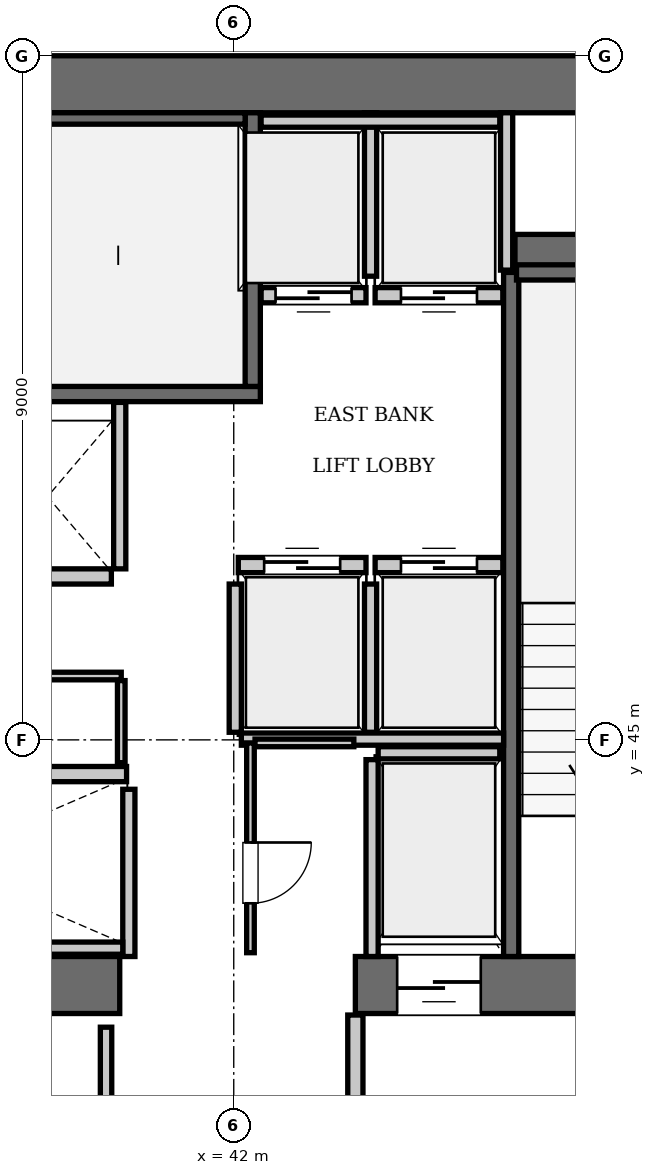
"""IFC4 building model, lengths in metres.
Left out: names, types, materials, properties, quantities, classifications, styles, units other than length and angle.
Written with IfcOpenShell. Run it as: python <this file> out.ifc"""

import sys

from ifc_helpers import new_model, si_unit, direction, frame, frame_2d, origin, place, context, subcontext, project, spatial, rectangle, extrude, element, fill, save


model = new_model("IFC4")
c1 = context("Model", 3, precision=1e-05, world=origin(), true_north=direction((0.0, 1.0)))
c2 = subcontext(c1, "Body", "Model", "MODEL_VIEW")
j1 = project(units=[si_unit("LENGTHUNIT", "METRE"), si_unit("PLANEANGLEUNIT", "RADIAN")], contexts=[c1])
p1 = place(None, origin())
s1 = spatial("IfcSite", under=j1, at=p1, CompositionType="ELEMENT")
p2 = place(p1, origin())
s2 = spatial("IfcBuilding", under=s1, at=p2, CompositionType="ELEMENT")
p3 = place(p2, frame((0.0, 0.0, 204.4)))
s3 = spatial("IfcBuildingStorey", under=s2, at=p3, CompositionType="ELEMENT", Elevation=204.4)
p4 = place(p3, frame((25.2, 53.625, 0.0), z_axis=(0.0, 0.0, 1.0), x_axis=(1.0, 0.0, 0.0)))
e1 = element("IfcWall", 1, at=p4, inside=s3, PredefinedType="SHEAR", context=c2, shape_type="SweptSolid", body=[
    extrude(rectangle(XDim=25.2, YDim=0.75, at=frame_2d((12.6, 0.0))), origin(), (0.0, 0.0, 1.0), 3.85),
])
p5 = place(p3, frame((35.1, 41.775, 0.0), z_axis=(0.0, 0.0, 1.0), x_axis=(1.0, 0.0, 0.0)))
e2 = element("IfcWall", 2, at=p5, inside=s3, PredefinedType="SHEAR", context=c2, shape_type="SweptSolid", body=[
    extrude(rectangle(XDim=5.4, YDim=0.75, at=frame_2d((2.7, 0.0))), origin(), (0.0, 0.0, 1.0), 3.85),
])
p6 = place(p3, frame((43.6, 41.775, 0.0), z_axis=(0.0, 0.0, 1.0), x_axis=(1.0, 0.0, 0.0)))
e3 = element("IfcWall", 3, at=p6, inside=s3, PredefinedType="SHEAR", context=c2, shape_type="SweptSolid", body=[
    extrude(rectangle(XDim=6.8, YDim=0.75, at=frame_2d((3.4, 0.0))), origin(), (0.0, 0.0, 1.0), 3.85),
])
p7 = place(p6, frame((3.9, 0.0, 0.0)))
e4 = element("IfcOpeningElement", 4, at=p7, cuts=e3, PredefinedType="OPENING", context=c2, shape_type="SweptSolid", body=[
    extrude(rectangle(XDim=1.15, YDim=2.15, at=frame_2d((0.575, 1.075))), frame((0.0, 0.385, 0.0), z_axis=(0.0, -1.0, 0.0), x_axis=(1.0, 0.0, 0.0)), (0.0, 0.0, 1.0), 0.77),
])
p8 = place(p6, frame((0.55, 0.0, 0.0)))
e5 = element("IfcOpeningElement", 5, at=p8, cuts=e3, PredefinedType="OPENING", context=c2, shape_type="SweptSolid", body=[
    extrude(rectangle(XDim=1.1, YDim=2.2, at=frame_2d((0.55, 1.1))), frame((0.0, 0.385, 0.0), z_axis=(0.0, -1.0, 0.0), x_axis=(1.0, 0.0, 0.0)), (0.0, 0.0, 1.0), 0.77),
])
p9 = place(p3, frame((45.7, 51.4, 0.0), z_axis=(0.0, 0.0, 1.0), x_axis=(1.0, 0.0, 0.0)))
e6 = element("IfcWall", 6, at=p9, inside=s3, PredefinedType="SHEAR", context=c2, shape_type="SweptSolid", body=[
    extrude(rectangle(XDim=3.95, YDim=0.5, at=frame_2d((1.975, 0.0))), origin(), (0.0, 0.0, 1.0), 3.85),
])
p10 = place(p3, frame((33.25, 49.55, 0.0), z_axis=(0.0, 0.0, 1.0), x_axis=(1.0, 0.0, 0.0)))
e7 = element("IfcWall", 7, at=p10, inside=s3, PredefinedType="SOLIDWALL", context=c2, shape_type="SweptSolid", body=[
    extrude(rectangle(XDim=9.1, YDim=0.2, at=frame_2d((4.55, 0.0))), origin(), (0.0, 0.0, 1.0), 3.61),
])
p11 = place(p3, frame((42.25, 49.65, 0.0), z_axis=(0.0, 0.0, 1.0), x_axis=(0.0, 1.0, 0.0)))
e8 = element("IfcWall", 8, at=p11, inside=s3, PredefinedType="SOLIDWALL", context=c2, shape_type="SweptSolid", body=[
    extrude(rectangle(XDim=3.6, YDim=0.2, at=frame_2d((1.8, 0.0))), origin(), (0.0, 0.0, 1.0), 3.61),
])
p12 = place(p3, frame((33.45, 53.175, 0.0), z_axis=(0.0, 0.0, 1.0), x_axis=(1.0, 0.0, 0.0)))
e9 = element("IfcWall", 9, at=p12, inside=s3, PredefinedType="SOLIDWALL", context=c2, shape_type="SweptSolid", body=[
    extrude(rectangle(XDim=8.7, YDim=0.15, at=frame_2d((4.35, 0.0))), origin(), (0.0, 0.0, 1.0), 3.61),
])
p13 = place(p3, frame((45.65, 42.15, 0.0), z_axis=(0.0, 0.0, 1.0), x_axis=(0.0, 1.0, 0.0)))
e10 = element("IfcWall", 10, at=p13, inside=s3, PredefinedType="SOLIDWALL", context=c2, shape_type="SweptSolid", body=[
    extrude(rectangle(XDim=9.0, YDim=0.2, at=frame_2d((4.5, 0.0))), origin(), (0.0, 0.0, 1.0), 3.61),
])
p14 = place(p3, frame((45.72, 51.15, 0.0), z_axis=(0.0, 0.0, 1.0), x_axis=(1.0, 0.0, 0.0)))
e11 = element("IfcWall", 11, at=p14, inside=s3, PredefinedType="SOLIDWALL", context=c2, shape_type="SweptSolid", body=[
    extrude(rectangle(XDim=3.5, YDim=0.2, at=frame_2d((1.75, 0.0))), origin(), (0.0, 0.0, 1.0), 3.61),
])
p15 = place(p3, frame((42.06, 47.3, 0.0), z_axis=(0.0, 0.0, 1.0), x_axis=(1.0, 0.0, 0.0)))
e12 = element("IfcWall", 12, at=p15, inside=s3, PredefinedType="SOLIDWALL", context=c2, shape_type="SweptSolid", body=[
    extrude(rectangle(XDim=1.68, YDim=0.2, at=frame_2d((0.84, 0.0))), origin(), (0.0, 0.0, 1.0), 3.61),
])
p16 = place(p15, frame((0.34, 0.0, 0.0)))
e13 = element("IfcOpeningElement", 13, at=p16, cuts=e12, PredefinedType="OPENING", context=c2, shape_type="SweptSolid", body=[
    extrude(rectangle(XDim=1.0, YDim=2.15, at=frame_2d((0.5, 1.075))), frame((0.0, 0.11, 0.0), z_axis=(0.0, -1.0, 0.0), x_axis=(1.0, 0.0, 0.0)), (0.0, 0.0, 1.0), 0.22),
])
p17 = place(p3, frame((43.86, 47.3, 0.0), z_axis=(0.0, 0.0, 1.0), x_axis=(1.0, 0.0, 0.0)))
e14 = element("IfcWall", 14, at=p17, inside=s3, PredefinedType="SOLIDWALL", context=c2, shape_type="SweptSolid", body=[
    extrude(rectangle(XDim=1.68, YDim=0.2, at=frame_2d((0.84, 0.0))), origin(), (0.0, 0.0, 1.0), 3.61),
])
p18 = place(p17, frame((0.34, 0.0, 0.0)))
e15 = element("IfcOpeningElement", 15, at=p18, cuts=e14, PredefinedType="OPENING", context=c2, shape_type="SweptSolid", body=[
    extrude(rectangle(XDim=1.0, YDim=2.15, at=frame_2d((0.5, 1.075))), frame((0.0, 0.11, 0.0), z_axis=(0.0, -1.0, 0.0), x_axis=(1.0, 0.0, 0.0)), (0.0, 0.0, 1.0), 0.22),
])
p19 = place(p3, frame((42.36, 50.85, 0.0), z_axis=(0.0, 0.0, 1.0), x_axis=(1.0, 0.0, 0.0)))
e16 = element("IfcWall", 16, at=p19, inside=s3, PredefinedType="SOLIDWALL", context=c2, shape_type="SweptSolid", body=[
    extrude(rectangle(XDim=1.38, YDim=0.2, at=frame_2d((0.69, 0.0))), origin(), (0.0, 0.0, 1.0), 3.61),
])
p20 = place(p19, frame((0.19, 0.0, 0.0)))
e17 = element("IfcOpeningElement", 17, at=p20, cuts=e16, PredefinedType="OPENING", context=c2, shape_type="SweptSolid", body=[
    extrude(rectangle(XDim=1.0, YDim=2.15, at=frame_2d((0.5, 1.075))), frame((0.0, 0.11, 0.0), z_axis=(0.0, -1.0, 0.0), x_axis=(1.0, 0.0, 0.0)), (0.0, 0.0, 1.0), 0.22),
])
p21 = place(p3, frame((43.86, 50.85, 0.0), z_axis=(0.0, 0.0, 1.0), x_axis=(1.0, 0.0, 0.0)))
e18 = element("IfcWall", 18, at=p21, inside=s3, PredefinedType="SOLIDWALL", context=c2, shape_type="SweptSolid", body=[
    extrude(rectangle(XDim=1.68, YDim=0.2, at=frame_2d((0.84, 0.0))), origin(), (0.0, 0.0, 1.0), 3.61),
])
p22 = place(p21, frame((0.34, 0.0, 0.0)))
e19 = element("IfcOpeningElement", 19, at=p22, cuts=e18, PredefinedType="OPENING", context=c2, shape_type="SweptSolid", body=[
    extrude(rectangle(XDim=1.0, YDim=2.15, at=frame_2d((0.5, 1.075))), frame((0.0, 0.11, 0.0), z_axis=(0.0, -1.0, 0.0), x_axis=(1.0, 0.0, 0.0)), (0.0, 0.0, 1.0), 0.22),
])
p23 = place(p3, frame((38.91, 44.55, 0.0), z_axis=(0.0, 0.0, 1.0), x_axis=(1.0, 0.0, 0.0)))
e20 = element("IfcWall", 20, at=p23, inside=s3, PredefinedType="SOLIDWALL", context=c2, shape_type="SweptSolid", body=[
    extrude(rectangle(XDim=1.68, YDim=0.2, at=frame_2d((0.84, 0.0))), origin(), (0.0, 0.0, 1.0), 3.61),
])
p24 = place(p3, frame((38.71, 47.15, 0.0), z_axis=(0.0, 0.0, 1.0), x_axis=(1.0, 0.0, 0.0)))
e21 = element("IfcWall", 21, at=p24, inside=s3, PredefinedType="SOLIDWALL", context=c2, shape_type="SweptSolid", body=[
    extrude(rectangle(XDim=1.68, YDim=0.2, at=frame_2d((0.84, 0.0))), origin(), (0.0, 0.0, 1.0), 3.61),
])
p25 = place(p3, frame((43.9, 44.83, 0.0), z_axis=(0.0, 0.0, 1.0), x_axis=(1.0, 0.0, 0.0)))
e22 = element("IfcWall", 22, at=p25, inside=s3, PredefinedType="SOLIDWALL", context=c2, shape_type="SweptSolid", body=[
    extrude(rectangle(XDim=1.6, YDim=0.16, at=frame_2d((0.8, 0.0))), origin(), (0.0, 0.0, 1.0), 3.61),
])
p26 = place(p3, frame((43.82, 42.15, 0.0), z_axis=(0.0, 0.0, 1.0), x_axis=(0.0, 1.0, 0.0)))
e23 = element("IfcWall", 23, at=p26, inside=s3, PredefinedType="SOLIDWALL", context=c2, shape_type="SweptSolid", body=[
    extrude(rectangle(XDim=2.59, YDim=0.16, at=frame_2d((1.295, 0.0))), origin(), (0.0, 0.0, 1.0), 3.61),
])
for number, where, z_axis, x_axis in (
    (24, (42.02, 45.1, 0.0), (0.0, 0.0, 1.0), (0.0, 1.0, 0.0)),
    (25, (43.8, 45.1, 0.0), (0.0, 0.0, 1.0), (0.0, 1.0, 0.0)),
):
    element("IfcWall", number, at=place(p3, frame(where, z_axis=z_axis, x_axis=x_axis)), inside=s3, PredefinedType="SOLIDWALL", context=c2, shape_type="SweptSolid", body=[
        extrude(rectangle(XDim=1.95, YDim=0.16, at=frame_2d((0.975, 0.0))), origin(), (0.0, 0.0, 1.0), 3.61),
    ])
p27 = place(p3, frame((42.1, 45.01, 0.0), z_axis=(0.0, 0.0, 1.0), x_axis=(1.0, 0.0, 0.0)))
e26 = element("IfcWall", 26, at=p27, inside=s3, PredefinedType="SOLIDWALL", context=c2, shape_type="SweptSolid", body=[
    extrude(rectangle(XDim=3.45, YDim=0.16, at=frame_2d((1.725, 0.0))), origin(), (0.0, 0.0, 1.0), 3.61),
])
p28 = place(p3, frame((45.59, 51.18, 0.0), z_axis=(0.0, 0.0, 1.0), x_axis=(0.0, 1.0, 0.0)))
e27 = element("IfcWall", 27, at=p28, inside=s3, PredefinedType="SOLIDWALL", context=c2, shape_type="SweptSolid", body=[
    extrude(rectangle(XDim=2.07, YDim=0.16, at=frame_2d((1.035, 0.0))), origin(), (0.0, 0.0, 1.0), 3.61),
])
p29 = place(p3, frame((43.8, 51.1, 0.0), z_axis=(0.0, 0.0, 1.0), x_axis=(0.0, 1.0, 0.0)))
e28 = element("IfcWall", 28, at=p29, inside=s3, PredefinedType="SOLIDWALL", context=c2, shape_type="SweptSolid", body=[
    extrude(rectangle(XDim=2.15, YDim=0.16, at=frame_2d((1.075, 0.0))), origin(), (0.0, 0.0, 1.0), 3.61),
])
p30 = place(p3, frame((42.36, 53.14, 0.0), z_axis=(0.0, 0.0, 1.0), x_axis=(1.0, 0.0, 0.0)))
e29 = element("IfcWall", 29, at=p30, inside=s3, PredefinedType="SOLIDWALL", context=c2, shape_type="SweptSolid", body=[
    extrude(rectangle(XDim=3.14, YDim=0.16, at=frame_2d((1.57, 0.0))), origin(), (0.0, 0.0, 1.0), 3.61),
])
p31 = place(p3, frame((40.62, 42.15, 0.0), z_axis=(0.0, 0.0, 1.0), x_axis=(0.0, 1.0, 0.0)))
e30 = element("IfcWall", 30, at=p31, inside=s3, PredefinedType="SOLIDWALL", context=c2, shape_type="SweptSolid", body=[
    extrude(rectangle(XDim=2.2, YDim=0.16, at=frame_2d((1.1, 0.0))), origin(), (0.0, 0.0, 1.0), 3.61),
])
p32 = place(p3, frame((35.52, 42.26, 0.0), z_axis=(0.0, 0.0, 1.0), x_axis=(1.0, 0.0, 0.0)))
e31 = element("IfcWall", 31, at=p32, inside=s3, PredefinedType="SOLIDWALL", context=c2, shape_type="SweptSolid", body=[
    extrude(rectangle(XDim=5.02, YDim=0.16, at=frame_2d((2.51, 0.0))), origin(), (0.0, 0.0, 1.0), 3.61),
])
p33 = place(p3, frame((40.5, 47.25, 0.0), z_axis=(0.0, 0.0, 1.0), x_axis=(0.0, 1.0, 0.0)))
e32 = element("IfcWall", 32, at=p33, inside=s3, PredefinedType="SOLIDWALL", context=c2, shape_type="SweptSolid", body=[
    extrude(rectangle(XDim=2.19, YDim=0.16, at=frame_2d((1.095, 0.0))), origin(), (0.0, 0.0, 1.0), 3.61),
])
p34 = place(p3, frame((43.6, 38.31, 0.0), z_axis=(0.0, 0.0, 1.0), x_axis=(0.0, 1.0, 0.0)))
e33 = element("IfcWall", 33, at=p34, inside=s3, PredefinedType="PARTITIONING", context=c2, shape_type="SweptSolid", body=[
    extrude(rectangle(XDim=3.07, YDim=0.2, at=frame_2d((1.535, 0.0))), origin(), (0.0, 0.0, 1.0), 3.61),
])
p35 = place(p3, frame((38.02, 45.84, 0.0), z_axis=(0.0, 0.0, 1.0), x_axis=(1.0, 0.0, 0.0)))
e34 = element("IfcWall", 34, at=p35, inside=s3, PredefinedType="PARTITIONING", context=c2, shape_type="SweptSolid", body=[
    extrude(rectangle(XDim=2.5, YDim=0.1, at=frame_2d((1.25, 0.0))), origin(), (0.0, 0.0, 1.0), 3.61),
])
p36 = place(p35, frame((0.75, 0.0, 0.0)))
e35 = element("IfcOpeningElement", 35, at=p36, cuts=e34, PredefinedType="OPENING", context=c2, shape_type="SweptSolid", body=[
    extrude(rectangle(XDim=0.8, YDim=2.05, at=frame_2d((0.4, 1.025))), frame((0.0, 0.06, 0.0), z_axis=(0.0, -1.0, 0.0), x_axis=(1.0, 0.0, 0.0)), (0.0, 0.0, 1.0), 0.12),
])
p37 = place(p3, frame((40.52, 44.7, 0.0), z_axis=(0.0, 0.0, 1.0), x_axis=(0.0, 1.0, 0.0)))
e36 = element("IfcWall", 36, at=p37, inside=s3, PredefinedType="PARTITIONING", context=c2, shape_type="SweptSolid", body=[
    extrude(rectangle(XDim=1.08, YDim=0.1, at=frame_2d((0.54, 0.0))), origin(), (0.0, 0.0, 1.0), 3.61),
])
p38 = place(p3, frame((42.22, 42.2, 0.0), z_axis=(0.0, 0.0, 1.0), x_axis=(0.0, 1.0, 0.0)))
e37 = element("IfcWall", 37, at=p38, inside=s3, PredefinedType="PARTITIONING", context=c2, shape_type="SweptSolid", body=[
    extrude(rectangle(XDim=2.76, YDim=0.1, at=frame_2d((1.38, 0.0))), origin(), (0.0, 0.0, 1.0), 3.61),
])
p39 = place(p38, frame((0.65, 0.0, 0.0)))
e38 = element("IfcOpeningElement", 38, at=p39, cuts=e37, PredefinedType="OPENING", context=c2, shape_type="SweptSolid", body=[
    extrude(rectangle(XDim=0.8, YDim=2.05, at=frame_2d((0.4, 1.025))), frame((0.0, 0.06, 0.0), z_axis=(0.0, -1.0, 0.0), x_axis=(1.0, 0.0, 0.0)), (0.0, 0.0, 1.0), 0.12),
])
p40 = place(p3, frame((42.28, 44.96, 0.0), z_axis=(0.0, 0.0, 1.0), x_axis=(1.0, 0.0, 0.0)))
e39 = element("IfcWall", 39, at=p40, inside=s3, PredefinedType="PARTITIONING", context=c2, shape_type="SweptSolid", body=[
    extrude(rectangle(XDim=1.3, YDim=0.1, at=frame_2d((0.65, 0.0))), origin(), (0.0, 0.0, 1.0), 3.61),
])
p41 = place(p3, frame((40.32, 38.38, 0.0), z_axis=(0.0, 0.0, 1.0), x_axis=(0.0, 1.0, 0.0)))
e40 = element("IfcWall", 40, at=p41, inside=s3, PredefinedType="PARTITIONING", context=c2, shape_type="SweptSolid", body=[
    extrude(rectangle(XDim=2.84, YDim=0.15, at=frame_2d((1.42, 0.0))), origin(), (0.0, 0.0, 1.0), 3.61),
])
p42 = place(p16, origin())
e41 = element("IfcDoor", 41, at=p42, inside=s3, OperationType="SLIDING_TO_LEFT", PredefinedType="DOOR", context=c2, shape_type="SweptSolid", body=[
    extrude(rectangle(XDim=1.0, YDim=2.15, at=frame_2d((0.5, 1.075))), frame((0.0, 0.025, 0.0), z_axis=(0.0, -1.0, 0.0), x_axis=(1.0, 0.0, 0.0)), (0.0, 0.0, 1.0), 0.05),
])
fill(e13, e41)
p43 = place(p18, origin())
e42 = element("IfcDoor", 42, at=p43, inside=s3, OperationType="SLIDING_TO_LEFT", PredefinedType="DOOR", context=c2, shape_type="SweptSolid", body=[
    extrude(rectangle(XDim=1.0, YDim=2.15, at=frame_2d((0.5, 1.075))), frame((0.0, 0.025, 0.0), z_axis=(0.0, -1.0, 0.0), x_axis=(1.0, 0.0, 0.0)), (0.0, 0.0, 1.0), 0.05),
])
fill(e15, e42)
p44 = place(p20, frame((1.0, 0.0, 0.0), z_axis=(0.0, 0.0, 1.0), x_axis=(-1.0, 0.0, 0.0)))
e43 = element("IfcDoor", 43, at=p44, inside=s3, OperationType="SLIDING_TO_LEFT", PredefinedType="DOOR", context=c2, shape_type="SweptSolid", body=[
    extrude(rectangle(XDim=1.0, YDim=2.15, at=frame_2d((0.5, 1.075))), frame((0.0, 0.025, 0.0), z_axis=(0.0, -1.0, 0.0), x_axis=(1.0, 0.0, 0.0)), (0.0, 0.0, 1.0), 0.05),
])
fill(e17, e43)
p45 = place(p22, frame((1.0, 0.0, 0.0), z_axis=(0.0, 0.0, 1.0), x_axis=(-1.0, 0.0, 0.0)))
e44 = element("IfcDoor", 44, at=p45, inside=s3, OperationType="SLIDING_TO_LEFT", PredefinedType="DOOR", context=c2, shape_type="SweptSolid", body=[
    extrude(rectangle(XDim=1.0, YDim=2.15, at=frame_2d((0.5, 1.075))), frame((0.0, 0.025, 0.0), z_axis=(0.0, -1.0, 0.0), x_axis=(1.0, 0.0, 0.0)), (0.0, 0.0, 1.0), 0.05),
])
fill(e19, e44)
p46 = place(p8, frame((1.1, 0.0, 0.0), z_axis=(0.0, 0.0, 1.0), x_axis=(-1.0, 0.0, 0.0)))
e45 = element("IfcDoor", 45, at=p46, inside=s3, OperationType="SLIDING_TO_LEFT", PredefinedType="DOOR", context=c2, shape_type="SweptSolid", body=[
    extrude(rectangle(XDim=1.1, YDim=2.2, at=frame_2d((0.55, 1.1))), frame((0.0, 0.025, 0.0), z_axis=(0.0, -1.0, 0.0), x_axis=(1.0, 0.0, 0.0)), (0.0, 0.0, 1.0), 0.05),
])
fill(e5, e45)
p47 = place(p39, frame((0.8, 0.0, 0.0), z_axis=(0.0, 0.0, 1.0), x_axis=(-1.0, 0.0, 0.0)))
e46 = element("IfcDoor", 46, at=p47, inside=s3, OperationType="SINGLE_SWING_LEFT", PredefinedType="DOOR", context=c2, shape_type="SweptSolid", body=[
    extrude(rectangle(XDim=0.8, YDim=2.05, at=frame_2d((0.4, 1.025))), frame((0.0, 0.025, 0.0), z_axis=(0.0, -1.0, 0.0), x_axis=(1.0, 0.0, 0.0)), (0.0, 0.0, 1.0), 0.05),
])
fill(e38, e46)
save(model, sys.argv[1])
